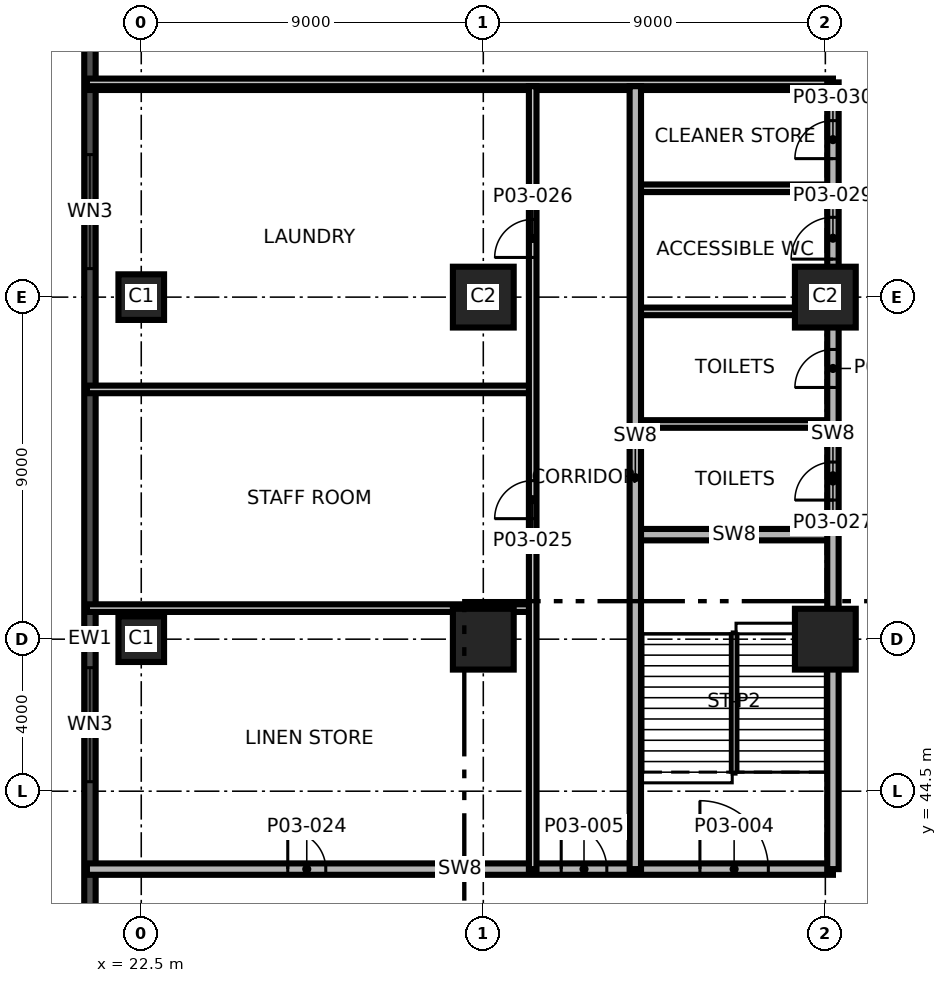
"""IFC4 building model, lengths in metres.
Left out: names, types, materials, properties, quantities, classifications, styles, units other than length and angle.
Written with IfcOpenShell. Run it as: python <this file> out.ifc"""

import sys

from ifc_helpers import new_model, si_unit, direction, frame, frame_2d, origin, origin_2d, place, context, subcontext, project, spatial, rectangle, extrude, element, fill, save


model = new_model("IFC4")
c1 = context("Model", 3, precision=1e-05, world=origin(), true_north=direction((0.0, 1.0)))
c2 = subcontext(c1, "Body", "Model", "MODEL_VIEW")
j1 = project(units=[si_unit("LENGTHUNIT", "METRE"), si_unit("PLANEANGLEUNIT", "RADIAN")], contexts=[c1])
p1 = place(None, origin())
s1 = spatial("IfcSite", under=j1, at=p1, CompositionType="ELEMENT")
p2 = place(p1, origin())
s2 = spatial("IfcBuilding", under=s1, at=p2, CompositionType="ELEMENT")
p3 = place(p2, frame((0.0, 0.0, 18.5)))
s3 = spatial("IfcBuildingStorey", under=s2, at=p3, CompositionType="ELEMENT", Elevation=18.5)
p4 = place(p3, frame((22.5, 48.5, 0.0), z_axis=(0.0, 0.0, 1.0), x_axis=(1.0, 0.0, 0.0)))
e1 = element("IfcColumn", 1, at=p4, inside=s3, PredefinedType="COLUMN", context=c2, shape_type="SweptSolid", body=[
    extrude(rectangle(XDim=1.2, YDim=1.2, at=origin_2d()), origin(), (0.0, 0.0, 1.0), 5.0),
])
for number, where, z_axis, x_axis in (
    (2, (31.5, 48.5, 0.0), (0.0, 0.0, 1.0), (1.0, 0.0, 0.0)),
    (3, (40.5, 48.5, 0.0), (0.0, 0.0, 1.0), (1.0, 0.0, 0.0)),
):
    element("IfcColumn", number, at=place(p3, frame(where, z_axis=z_axis, x_axis=x_axis)), inside=s3, PredefinedType="COLUMN", context=c2, shape_type="SweptSolid", body=[
        extrude(rectangle(XDim=1.6, YDim=1.6, at=origin_2d()), origin(), (0.0, 0.0, 1.0), 5.0),
    ])
p5 = place(p3, frame((22.5, 57.5, 0.0), z_axis=(0.0, 0.0, 1.0), x_axis=(1.0, 0.0, 0.0)))
e4 = element("IfcColumn", 4, at=p5, inside=s3, PredefinedType="COLUMN", context=c2, shape_type="SweptSolid", body=[
    extrude(rectangle(XDim=1.2, YDim=1.2, at=origin_2d()), origin(), (0.0, 0.0, 1.0), 5.0),
])
for number, where, z_axis, x_axis in (
    (5, (31.5, 57.5, 0.0), (0.0, 0.0, 1.0), (1.0, 0.0, 0.0)),
    (6, (40.5, 57.5, 0.0), (0.0, 0.0, 1.0), (1.0, 0.0, 0.0)),
):
    element("IfcColumn", number, at=place(p3, frame(where, z_axis=z_axis, x_axis=x_axis)), inside=s3, PredefinedType="COLUMN", context=c2, shape_type="SweptSolid", body=[
        extrude(rectangle(XDim=1.6, YDim=1.6, at=origin_2d()), origin(), (0.0, 0.0, 1.0), 5.0),
    ])
p6 = place(p3, frame((21.15, 79.952, 0.0), z_axis=(0.0, 0.0, 1.0), x_axis=(0.0, -1.0, 0.0)))
e7 = element("IfcWall", 7, at=p6, inside=s3, PredefinedType="SOLIDWALL", context=c2, shape_type="SweptSolid", body=[
    extrude(rectangle(XDim=62.88, YDim=0.3, at=frame_2d((31.44, 0.0))), origin(), (0.0, 0.0, 1.0), 4.7),
])
p7 = place(p6, frame((0.726, 0.0, 0.9)))
e8 = element("IfcOpeningElement", 8, at=p7, cuts=e7, PredefinedType="OPENING", context=c2, shape_type="SweptSolid", body=[
    extrude(rectangle(XDim=3.0, YDim=2.4, at=frame_2d((1.5, 1.2))), frame((0.0, 0.16, 0.0), z_axis=(0.0, -1.0, 0.0), x_axis=(1.0, 0.0, 0.0)), (0.0, 0.0, 1.0), 0.32),
])
p8 = place(p6, frame((5.202, 0.0, 0.9)))
e9 = element("IfcOpeningElement", 9, at=p8, cuts=e7, PredefinedType="OPENING", context=c2, shape_type="SweptSolid", body=[
    extrude(rectangle(XDim=3.0, YDim=2.4, at=frame_2d((1.5, 1.2))), frame((0.0, 0.16, 0.0), z_axis=(0.0, -1.0, 0.0), x_axis=(1.0, 0.0, 0.0)), (0.0, 0.0, 1.0), 0.32),
])
p9 = place(p6, frame((9.702, 0.0, 0.9)))
e10 = element("IfcOpeningElement", 10, at=p9, cuts=e7, PredefinedType="OPENING", context=c2, shape_type="SweptSolid", body=[
    extrude(rectangle(XDim=3.0, YDim=2.4, at=frame_2d((1.5, 1.2))), frame((0.0, 0.16, 0.0), z_axis=(0.0, -1.0, 0.0), x_axis=(1.0, 0.0, 0.0)), (0.0, 0.0, 1.0), 0.32),
])
p10 = place(p6, frame((18.702, 0.0, 0.9)))
e11 = element("IfcOpeningElement", 11, at=p10, cuts=e7, PredefinedType="OPENING", context=c2, shape_type="SweptSolid", body=[
    extrude(rectangle(XDim=3.0, YDim=2.4, at=frame_2d((1.5, 1.2))), frame((0.0, 0.16, 0.0), z_axis=(0.0, -1.0, 0.0), x_axis=(1.0, 0.0, 0.0)), (0.0, 0.0, 1.0), 0.32),
])
p11 = place(p6, frame((32.202, 0.0, 0.9)))
e12 = element("IfcOpeningElement", 12, at=p11, cuts=e7, PredefinedType="OPENING", context=c2, shape_type="SweptSolid", body=[
    extrude(rectangle(XDim=3.0, YDim=2.4, at=frame_2d((1.5, 1.2))), frame((0.0, 0.16, 0.0), z_axis=(0.0, -1.0, 0.0), x_axis=(1.0, 0.0, 0.0)), (0.0, 0.0, 1.0), 0.32),
])
p12 = place(p6, frame((41.202, 0.0, 0.9)))
e13 = element("IfcOpeningElement", 13, at=p12, cuts=e7, PredefinedType="OPENING", context=c2, shape_type="SweptSolid", body=[
    extrude(rectangle(XDim=3.0, YDim=2.4, at=frame_2d((1.5, 1.2))), frame((0.0, 0.16, 0.0), z_axis=(0.0, -1.0, 0.0), x_axis=(1.0, 0.0, 0.0)), (0.0, 0.0, 1.0), 0.32),
])
p13 = place(p6, frame((45.702, 0.0, 0.9)))
e14 = element("IfcOpeningElement", 14, at=p13, cuts=e7, PredefinedType="OPENING", context=c2, shape_type="SweptSolid", body=[
    extrude(rectangle(XDim=3.0, YDim=2.4, at=frame_2d((1.5, 1.2))), frame((0.0, 0.16, 0.0), z_axis=(0.0, -1.0, 0.0), x_axis=(1.0, 0.0, 0.0)), (0.0, 0.0, 1.0), 0.32),
])
p14 = place(p6, frame((50.202, 0.0, 0.9)))
e15 = element("IfcOpeningElement", 15, at=p14, cuts=e7, PredefinedType="OPENING", context=c2, shape_type="SweptSolid", body=[
    extrude(rectangle(XDim=3.0, YDim=2.4, at=frame_2d((1.5, 1.2))), frame((0.0, 0.16, 0.0), z_axis=(0.0, -1.0, 0.0), x_axis=(1.0, 0.0, 0.0)), (0.0, 0.0, 1.0), 0.32),
])
p15 = place(p6, frame((54.702, 0.0, 0.9)))
e16 = element("IfcOpeningElement", 16, at=p15, cuts=e7, PredefinedType="OPENING", context=c2, shape_type="SweptSolid", body=[
    extrude(rectangle(XDim=3.0, YDim=2.4, at=frame_2d((1.5, 1.2))), frame((0.0, 0.16, 0.0), z_axis=(0.0, -1.0, 0.0), x_axis=(1.0, 0.0, 0.0)), (0.0, 0.0, 1.0), 0.32),
])
p16 = place(p6, frame((59.226, 0.0, 0.9)))
e17 = element("IfcOpeningElement", 17, at=p16, cuts=e7, PredefinedType="OPENING", context=c2, shape_type="SweptSolid", body=[
    extrude(rectangle(XDim=3.0, YDim=2.4, at=frame_2d((1.5, 1.2))), frame((0.0, 0.16, 0.0), z_axis=(0.0, -1.0, 0.0), x_axis=(1.0, 0.0, 0.0)), (0.0, 0.0, 1.0), 0.32),
])
p17 = place(p3, frame((21.07, 42.45, 0.0), z_axis=(0.0, 0.0, 1.0), x_axis=(1.0, 0.0, 0.0)))
e18 = element("IfcWall", 18, at=p17, inside=s3, PredefinedType="SHEAR", context=c2, shape_type="SweptSolid", body=[
    extrude(rectangle(XDim=19.63, YDim=0.3, at=frame_2d((9.815, 0.0))), origin(), (0.0, 0.0, 1.0), 4.7),
])
p18 = place(p17, frame((16.13, 0.0, 0.0)))
e19 = element("IfcOpeningElement", 19, at=p18, cuts=e18, PredefinedType="OPENING", context=c2, shape_type="SweptSolid", body=[
    extrude(rectangle(XDim=1.8, YDim=2.1, at=frame_2d((0.9, 1.05))), frame((0.0, 0.16, 0.0), z_axis=(0.0, -1.0, 0.0), x_axis=(1.0, 0.0, 0.0)), (0.0, 0.0, 1.0), 0.32),
])
p19 = place(p17, frame((12.48, 0.0, 0.0)))
e20 = element("IfcOpeningElement", 20, at=p19, cuts=e18, PredefinedType="OPENING", context=c2, shape_type="SweptSolid", body=[
    extrude(rectangle(XDim=1.2, YDim=2.1, at=frame_2d((0.6, 1.05))), frame((0.0, 0.16, 0.0), z_axis=(0.0, -1.0, 0.0), x_axis=(1.0, 0.0, 0.0)), (0.0, 0.0, 1.0), 0.32),
])
p20 = place(p17, frame((5.285, 0.0, 0.0)))
e21 = element("IfcOpeningElement", 21, at=p20, cuts=e18, PredefinedType="OPENING", context=c2, shape_type="SweptSolid", body=[
    extrude(rectangle(XDim=1.0, YDim=2.1, at=frame_2d((0.5, 1.05))), frame((0.0, 0.16, 0.0), z_axis=(0.0, -1.0, 0.0), x_axis=(1.0, 0.0, 0.0)), (0.0, 0.0, 1.0), 0.32),
])
p21 = place(p3, frame((21.07, 49.317, 0.0), z_axis=(0.0, 0.0, 1.0), x_axis=(1.0, 0.0, 0.0)))
e22 = element("IfcWall", 22, at=p21, inside=s3, PredefinedType="PARTITIONING", context=c2, shape_type="SweptSolid", body=[
    extrude(rectangle(XDim=11.73, YDim=0.2, at=frame_2d((5.865, 0.0))), origin(), (0.0, 0.0, 1.0), 4.7),
])
p22 = place(p3, frame((35.5, 51.25, 0.0), z_axis=(0.0, 0.0, 1.0), x_axis=(1.0, 0.0, 0.0)))
e23 = element("IfcWall", 23, at=p22, inside=s3, PredefinedType="SHEAR", context=c2, shape_type="SweptSolid", body=[
    extrude(rectangle(XDim=5.2, YDim=0.3, at=frame_2d((2.6, 0.0))), origin(), (0.0, 0.0, 1.0), 4.7),
])
p23 = place(p3, frame((35.55, 54.162, 0.0), z_axis=(0.0, 0.0, 1.0), x_axis=(1.0, 0.0, 0.0)))
e24 = element("IfcWall", 24, at=p23, inside=s3, PredefinedType="PARTITIONING", context=c2, shape_type="SweptSolid", body=[
    extrude(rectangle(XDim=5.15, YDim=0.2, at=frame_2d((2.575, 0.0))), origin(), (0.0, 0.0, 1.0), 4.7),
])
p24 = place(p3, frame((21.07, 55.072, 0.0), z_axis=(0.0, 0.0, 1.0), x_axis=(1.0, 0.0, 0.0)))
e25 = element("IfcWall", 25, at=p24, inside=s3, PredefinedType="PARTITIONING", context=c2, shape_type="SweptSolid", body=[
    extrude(rectangle(XDim=11.73, YDim=0.2, at=frame_2d((5.865, 0.0))), origin(), (0.0, 0.0, 1.0), 4.7),
])
for number, where, z_axis, x_axis in (
    (26, (35.55, 57.125, 0.0), (0.0, 0.0, 1.0), (1.0, 0.0, 0.0)),
    (27, (35.55, 60.364, 0.0), (0.0, 0.0, 1.0), (1.0, 0.0, 0.0)),
):
    element("IfcWall", number, at=place(p3, frame(where, z_axis=z_axis, x_axis=x_axis)), inside=s3, PredefinedType="PARTITIONING", context=c2, shape_type="SweptSolid", body=[
        extrude(rectangle(XDim=5.15, YDim=0.2, at=frame_2d((2.575, 0.0))), origin(), (0.0, 0.0, 1.0), 4.7),
    ])
p25 = place(p3, frame((21.07, 63.05, 0.0), z_axis=(0.0, 0.0, 1.0), x_axis=(1.0, 0.0, 0.0)))
e28 = element("IfcWall", 28, at=p25, inside=s3, PredefinedType="PARTITIONING", context=c2, shape_type="SweptSolid", body=[
    extrude(rectangle(XDim=14.43, YDim=0.2, at=frame_2d((7.215, 0.0))), origin(), (0.0, 0.0, 1.0), 4.7),
])
p26 = place(p3, frame((35.55, 63.05, 0.0), z_axis=(0.0, 0.0, 1.0), x_axis=(1.0, 0.0, 0.0)))
e29 = element("IfcWall", 29, at=p26, inside=s3, PredefinedType="PARTITIONING", context=c2, shape_type="SweptSolid", body=[
    extrude(rectangle(XDim=5.15, YDim=0.2, at=frame_2d((2.575, 0.0))), origin(), (0.0, 0.0, 1.0), 4.7),
])
p27 = place(p3, frame((21.07, 63.15, 0.0), z_axis=(0.0, 0.0, 1.0), x_axis=(1.0, 0.0, 0.0)))
e30 = element("IfcWall", 30, at=p27, inside=s3, PredefinedType="PARTITIONING", context=c2, shape_type="SweptSolid", body=[
    extrude(rectangle(XDim=19.63, YDim=0.2, at=frame_2d((9.815, 0.0))), origin(), (0.0, 0.0, 1.0), 4.7),
])
p28 = place(p3, frame((32.8, 42.45, 0.0), z_axis=(0.0, 0.0, 1.0), x_axis=(0.0, 1.0, 0.0)))
e31 = element("IfcWall", 31, at=p28, inside=s3, PredefinedType="PARTITIONING", context=c2, shape_type="SweptSolid", body=[
    extrude(rectangle(XDim=20.6, YDim=0.2, at=frame_2d((10.3, 0.0))), origin(), (0.0, 0.0, 1.0), 4.7),
])
p29 = place(p28, frame((9.221, 0.0, 0.0)))
e32 = element("IfcOpeningElement", 32, at=p29, cuts=e31, PredefinedType="OPENING", context=c2, shape_type="SweptSolid", body=[
    extrude(rectangle(XDim=1.0, YDim=2.1, at=frame_2d((0.5, 1.05))), frame((0.0, 0.11, 0.0), z_axis=(0.0, -1.0, 0.0), x_axis=(1.0, 0.0, 0.0)), (0.0, 0.0, 1.0), 0.22),
])
p30 = place(p28, frame((16.094, 0.0, 0.0)))
e33 = element("IfcOpeningElement", 33, at=p30, cuts=e31, PredefinedType="OPENING", context=c2, shape_type="SweptSolid", body=[
    extrude(rectangle(XDim=1.0, YDim=2.1, at=frame_2d((0.5, 1.05))), frame((0.0, 0.11, 0.0), z_axis=(0.0, -1.0, 0.0), x_axis=(1.0, 0.0, 0.0)), (0.0, 0.0, 1.0), 0.22),
])
p31 = place(p3, frame((35.5, 42.45, 0.0), z_axis=(0.0, 0.0, 1.0), x_axis=(0.0, 1.0, 0.0)))
e34 = element("IfcWall", 34, at=p31, inside=s3, PredefinedType="SHEAR", context=c2, shape_type="SweptSolid", body=[
    extrude(rectangle(XDim=20.6, YDim=0.3, at=frame_2d((10.3, 0.0))), origin(), (0.0, 0.0, 1.0), 4.7),
])
p32 = place(p3, frame((40.7, 42.45, 0.0), z_axis=(0.0, 0.0, 1.0), x_axis=(0.0, 1.0, 0.0)))
e35 = element("IfcWall", 35, at=p32, inside=s3, PredefinedType="SHEAR", context=c2, shape_type="SweptSolid", body=[
    extrude(rectangle(XDim=20.7, YDim=0.3, at=frame_2d((10.35, 0.0))), origin(), (0.0, 0.0, 1.0), 4.7),
])
p33 = place(p32, frame((9.71, 0.0, 0.0)))
e36 = element("IfcOpeningElement", 36, at=p33, cuts=e35, PredefinedType="OPENING", context=c2, shape_type="SweptSolid", body=[
    extrude(rectangle(XDim=1.0, YDim=2.1, at=frame_2d((0.5, 1.05))), frame((0.0, 0.16, 0.0), z_axis=(0.0, -1.0, 0.0), x_axis=(1.0, 0.0, 0.0)), (0.0, 0.0, 1.0), 0.32),
])
p34 = place(p32, frame((12.673, 0.0, 0.0)))
e37 = element("IfcOpeningElement", 37, at=p34, cuts=e35, PredefinedType="OPENING", context=c2, shape_type="SweptSolid", body=[
    extrude(rectangle(XDim=1.0, YDim=2.1, at=frame_2d((0.5, 1.05))), frame((0.0, 0.16, 0.0), z_axis=(0.0, -1.0, 0.0), x_axis=(1.0, 0.0, 0.0)), (0.0, 0.0, 1.0), 0.32),
])
p35 = place(p32, frame((16.05, 0.0, 0.0)))
e38 = element("IfcOpeningElement", 38, at=p35, cuts=e35, PredefinedType="OPENING", context=c2, shape_type="SweptSolid", body=[
    extrude(rectangle(XDim=1.1, YDim=2.1, at=frame_2d((0.55, 1.05))), frame((0.0, 0.16, 0.0), z_axis=(0.0, -1.0, 0.0), x_axis=(1.0, 0.0, 0.0)), (0.0, 0.0, 1.0), 0.32),
])
p36 = place(p32, frame((18.694, 0.0, 0.0)))
e39 = element("IfcOpeningElement", 39, at=p36, cuts=e35, PredefinedType="OPENING", context=c2, shape_type="SweptSolid", body=[
    extrude(rectangle(XDim=1.0, YDim=2.1, at=frame_2d((0.5, 1.05))), frame((0.0, 0.16, 0.0), z_axis=(0.0, -1.0, 0.0), x_axis=(1.0, 0.0, 0.0)), (0.0, 0.0, 1.0), 0.32),
])
p37 = place(p10, origin())
e40 = element("IfcWindow", 40, at=p37, inside=s3, PartitioningType="SINGLE_PANEL", PredefinedType="WINDOW", context=c2, shape_type="SweptSolid", body=[
    extrude(rectangle(XDim=3.0, YDim=2.4, at=frame_2d((1.5, 1.2))), frame((0.0, 0.03, 0.0), z_axis=(0.0, -1.0, 0.0), x_axis=(1.0, 0.0, 0.0)), (0.0, 0.0, 1.0), 0.06),
])
fill(e11, e40)
p38 = place(p11, origin())
e41 = element("IfcWindow", 41, at=p38, inside=s3, PartitioningType="SINGLE_PANEL", PredefinedType="WINDOW", context=c2, shape_type="SweptSolid", body=[
    extrude(rectangle(XDim=3.0, YDim=2.4, at=frame_2d((1.5, 1.2))), frame((0.0, 0.03, 0.0), z_axis=(0.0, -1.0, 0.0), x_axis=(1.0, 0.0, 0.0)), (0.0, 0.0, 1.0), 0.06),
])
fill(e12, e41)
p39 = place(p18, origin())
e42 = element("IfcDoor", 42, at=p39, inside=s3, OperationType="SINGLE_SWING_RIGHT", PredefinedType="DOOR", context=c2, shape_type="SweptSolid", body=[
    extrude(rectangle(XDim=1.8, YDim=2.1, at=frame_2d((0.9, 1.05))), frame((0.0, 0.025, 0.0), z_axis=(0.0, -1.0, 0.0), x_axis=(1.0, 0.0, 0.0)), (0.0, 0.0, 1.0), 0.05),
])
fill(e19, e42)
p40 = place(p19, origin())
e43 = element("IfcDoor", 43, at=p40, inside=s3, OperationType="SINGLE_SWING_LEFT", PredefinedType="DOOR", context=c2, shape_type="SweptSolid", body=[
    extrude(rectangle(XDim=1.2, YDim=2.1, at=frame_2d((0.6, 1.05))), frame((0.0, 0.025, 0.0), z_axis=(0.0, -1.0, 0.0), x_axis=(1.0, 0.0, 0.0)), (0.0, 0.0, 1.0), 0.05),
])
fill(e20, e43)
p41 = place(p20, origin())
e44 = element("IfcDoor", 44, at=p41, inside=s3, OperationType="SINGLE_SWING_RIGHT", PredefinedType="DOOR", context=c2, shape_type="SweptSolid", body=[
    extrude(rectangle(XDim=1.0, YDim=2.1, at=frame_2d((0.5, 1.05))), frame((0.0, 0.025, 0.0), z_axis=(0.0, -1.0, 0.0), x_axis=(1.0, 0.0, 0.0)), (0.0, 0.0, 1.0), 0.05),
])
fill(e21, e44)
p42 = place(p29, origin())
e45 = element("IfcDoor", 45, at=p42, inside=s3, OperationType="SINGLE_SWING_LEFT", PredefinedType="DOOR", context=c2, shape_type="SweptSolid", body=[
    extrude(rectangle(XDim=1.0, YDim=2.1, at=frame_2d((0.5, 1.05))), frame((0.0, 0.025, 0.0), z_axis=(0.0, -1.0, 0.0), x_axis=(1.0, 0.0, 0.0)), (0.0, 0.0, 1.0), 0.05),
])
fill(e32, e45)
p43 = place(p30, origin())
e46 = element("IfcDoor", 46, at=p43, inside=s3, OperationType="SINGLE_SWING_RIGHT", PredefinedType="DOOR", context=c2, shape_type="SweptSolid", body=[
    extrude(rectangle(XDim=1.0, YDim=2.1, at=frame_2d((0.5, 1.05))), frame((0.0, 0.025, 0.0), z_axis=(0.0, -1.0, 0.0), x_axis=(1.0, 0.0, 0.0)), (0.0, 0.0, 1.0), 0.05),
])
fill(e33, e46)
p44 = place(p33, origin())
e47 = element("IfcDoor", 47, at=p44, inside=s3, OperationType="SINGLE_SWING_LEFT", PredefinedType="DOOR", context=c2, shape_type="SweptSolid", body=[
    extrude(rectangle(XDim=1.0, YDim=2.1, at=frame_2d((0.5, 1.05))), frame((0.0, 0.025, 0.0), z_axis=(0.0, -1.0, 0.0), x_axis=(1.0, 0.0, 0.0)), (0.0, 0.0, 1.0), 0.05),
])
fill(e36, e47)
p45 = place(p34, origin())
e48 = element("IfcDoor", 48, at=p45, inside=s3, OperationType="SINGLE_SWING_RIGHT", PredefinedType="DOOR", context=c2, shape_type="SweptSolid", body=[
    extrude(rectangle(XDim=1.0, YDim=2.1, at=frame_2d((0.5, 1.05))), frame((0.0, 0.025, 0.0), z_axis=(0.0, -1.0, 0.0), x_axis=(1.0, 0.0, 0.0)), (0.0, 0.0, 1.0), 0.05),
])
fill(e37, e48)
p46 = place(p35, origin())
e49 = element("IfcDoor", 49, at=p46, inside=s3, OperationType="SINGLE_SWING_LEFT", PredefinedType="DOOR", context=c2, shape_type="SweptSolid", body=[
    extrude(rectangle(XDim=1.1, YDim=2.1, at=frame_2d((0.55, 1.05))), frame((0.0, 0.025, 0.0), z_axis=(0.0, -1.0, 0.0), x_axis=(1.0, 0.0, 0.0)), (0.0, 0.0, 1.0), 0.05),
])
fill(e38, e49)
p47 = place(p36, origin())
e50 = element("IfcDoor", 50, at=p47, inside=s3, OperationType="SINGLE_SWING_RIGHT", PredefinedType="DOOR", context=c2, shape_type="SweptSolid", body=[
    extrude(rectangle(XDim=1.0, YDim=2.1, at=frame_2d((0.5, 1.05))), frame((0.0, 0.025, 0.0), z_axis=(0.0, -1.0, 0.0), x_axis=(1.0, 0.0, 0.0)), (0.0, 0.0, 1.0), 0.05),
])
fill(e39, e50)
save(model, sys.argv[1])
